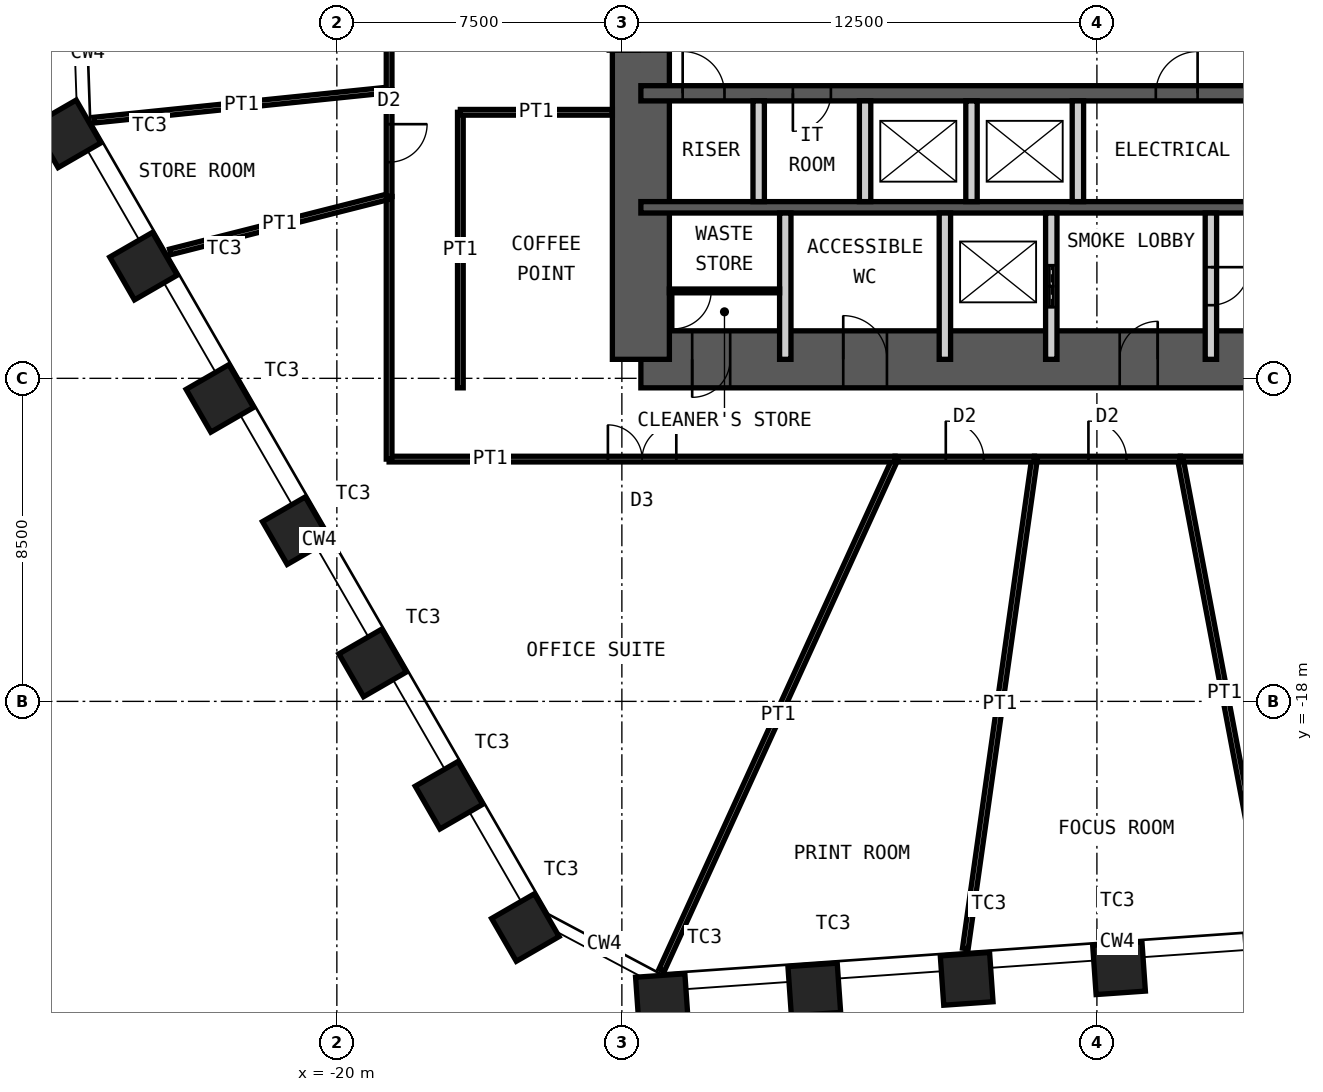
"""IFC4 building model, lengths in metres.
Left out: names, types, materials, properties, quantities, classifications, styles, units other than length and angle.
Written with IfcOpenShell. Run it as: python <this file> out.ifc"""

import sys

from ifc_helpers import new_model, si_unit, direction, frame, frame_2d, origin, origin_2d, place, context, subcontext, project, spatial, rectangle, hollow_rectangle, extrude, element, fill, save


model = new_model("IFC4")
c1 = context("Model", 3, precision=1e-05, world=origin(), true_north=direction((0.0, 1.0)))
c2 = subcontext(c1, "Body", "Model", "MODEL_VIEW")
j1 = project(units=[si_unit("LENGTHUNIT", "METRE"), si_unit("PLANEANGLEUNIT", "RADIAN")], contexts=[c1])
p1 = place(None, origin())
s1 = spatial("IfcSite", under=j1, at=p1, CompositionType="ELEMENT")
p2 = place(p1, origin())
s2 = spatial("IfcBuilding", under=s1, at=p2, CompositionType="ELEMENT")
p3 = place(p2, frame((0.0, 0.0, 115.6)))
s3 = spatial("IfcBuildingStorey", under=s2, at=p3, CompositionType="ELEMENT", Elevation=115.6)
for number, where, z_axis, x_axis in (
    (1, (0.582, -25.02, 0.0), (0.0, 0.0, 1.0), (0.998, 0.07, 0.0)),
    (2, (-3.427, -25.301, 0.0), (0.0, 0.0, 1.0), (0.998, 0.07, 0.0)),
    (3, (-7.436, -25.581, 0.0), (0.0, 0.0, 1.0), (0.998, 0.07, 0.0)),
    (4, (-11.446, -25.861, 0.0), (0.0, 0.0, 1.0), (0.998, 0.07, 0.0)),
    (5, (-15.04, -23.95, 0.0), (0.0, 0.0, 1.0), (0.5, -0.866, 0.0)),
    (6, (-17.049, -20.47, 0.0), (0.0, 0.0, 1.0), (0.5, -0.866, 0.0)),
    (7, (-19.059, -16.989, 0.0), (0.0, 0.0, 1.0), (0.5, -0.866, 0.0)),
    (8, (-21.068, -13.509, 0.0), (0.0, 0.0, 1.0), (0.5, -0.866, 0.0)),
    (9, (-23.078, -10.028, 0.0), (0.0, 0.0, 1.0), (0.5, -0.866, 0.0)),
    (10, (-25.087, -6.547, 0.0), (0.0, 0.0, 1.0), (0.5, -0.866, 0.0)),
    (11, (-27.097, -3.067, 0.0), (0.0, 0.0, 1.0), (0.5, -0.866, 0.0)),
):
    element("IfcColumn", number, at=place(p3, frame(where, z_axis=z_axis, x_axis=x_axis)), inside=s3, PredefinedType="COLUMN", context=c2, shape_type="SweptSolid", body=[
        extrude(hollow_rectangle(XDim=1.3, YDim=1.3, WallThickness=0.1, at=origin_2d()), origin(), (0.0, 0.0, 1.0), 4.2),
    ])
p4 = place(p3, frame((-12.0, -9.0, 0.0), z_axis=(0.0, 0.0, 1.0), x_axis=(1.0, 0.0, 0.0)))
e12 = element("IfcWall", 12, at=p4, inside=s3, PredefinedType="SHEAR", context=c2, shape_type="SweptSolid", body=[
    extrude(rectangle(XDim=24.0, YDim=1.5, at=frame_2d((12.0, 0.0))), origin(), (0.0, 0.0, 1.0), 4.2),
])
p5 = place(p4, frame((1.35, 0.0, 0.0)))
e13 = element("IfcOpeningElement", 13, at=p5, cuts=e12, PredefinedType="OPENING", context=c2, shape_type="SweptSolid", body=[
    extrude(rectangle(XDim=1.0, YDim=2.1, at=frame_2d((0.5, 1.05))), frame((0.0, 0.76, 0.0), z_axis=(0.0, -1.0, 0.0), x_axis=(1.0, 0.0, 0.0)), (0.0, 0.0, 1.0), 1.52),
])
p6 = place(p4, frame((5.325, 0.0, 0.0)))
e14 = element("IfcOpeningElement", 14, at=p6, cuts=e12, PredefinedType="OPENING", context=c2, shape_type="SweptSolid", body=[
    extrude(rectangle(XDim=1.15, YDim=2.1, at=frame_2d((0.575, 1.05))), frame((0.0, 0.76, 0.0), z_axis=(0.0, -1.0, 0.0), x_axis=(1.0, 0.0, 0.0)), (0.0, 0.0, 1.0), 1.52),
])
p7 = place(p4, frame((12.6, 0.0, 0.0)))
e15 = element("IfcOpeningElement", 15, at=p7, cuts=e12, PredefinedType="OPENING", context=c2, shape_type="SweptSolid", body=[
    extrude(rectangle(XDim=1.0, YDim=2.1, at=frame_2d((0.5, 1.05))), frame((0.0, 0.76, 0.0), z_axis=(0.0, -1.0, 0.0), x_axis=(1.0, 0.0, 0.0)), (0.0, 0.0, 1.0), 1.52),
])
p8 = place(p3, frame((-12.0, -9.0, 0.0), z_axis=(0.0, 0.0, 1.0), x_axis=(0.0, 1.0, 0.0)))
e16 = element("IfcWall", 16, at=p8, inside=s3, PredefinedType="SHEAR", context=c2, shape_type="SweptSolid", body=[
    extrude(rectangle(XDim=18.0, YDim=1.5, at=frame_2d((9.0, 0.0))), origin(), (0.0, 0.0, 1.0), 4.2),
])
p9 = place(p8, frame((8.1, 0.0, 0.0)))
e17 = element("IfcOpeningElement", 17, at=p9, cuts=e16, PredefinedType="OPENING", context=c2, shape_type="SweptSolid", body=[
    extrude(rectangle(XDim=1.8, YDim=2.1, at=frame_2d((0.9, 1.05))), frame((0.0, 0.76, 0.0), z_axis=(0.0, -1.0, 0.0), x_axis=(1.0, 0.0, 0.0)), (0.0, 0.0, 1.0), 1.52),
])
p10 = place(p3, frame((-12.0, -2.0, 0.0), z_axis=(0.0, 0.0, 1.0), x_axis=(1.0, 0.0, 0.0)))
e18 = element("IfcWall", 18, at=p10, inside=s3, PredefinedType="SHEAR", context=c2, shape_type="SweptSolid", body=[
    extrude(rectangle(XDim=24.0, YDim=0.4, at=frame_2d((12.0, 0.0))), origin(), (0.0, 0.0, 1.0), 4.2),
])
p11 = place(p10, frame((1.1, 0.0, 0.0)))
e19 = element("IfcOpeningElement", 19, at=p11, cuts=e18, PredefinedType="OPENING", context=c2, shape_type="SweptSolid", body=[
    extrude(rectangle(XDim=1.1, YDim=2.1, at=frame_2d((0.55, 1.05))), frame((0.0, 0.21, 0.0), z_axis=(0.0, -1.0, 0.0), x_axis=(1.0, 0.0, 0.0)), (0.0, 0.0, 1.0), 0.42),
])
p12 = place(p10, frame((13.55, 0.0, 0.0)))
e20 = element("IfcOpeningElement", 20, at=p12, cuts=e18, PredefinedType="OPENING", context=c2, shape_type="SweptSolid", body=[
    extrude(rectangle(XDim=1.1, YDim=2.1, at=frame_2d((0.55, 1.05))), frame((0.0, 0.21, 0.0), z_axis=(0.0, -1.0, 0.0), x_axis=(1.0, 0.0, 0.0)), (0.0, 0.0, 1.0), 0.42),
])
p13 = place(p10, frame((20.7, 0.0, 0.0)))
e21 = element("IfcOpeningElement", 21, at=p13, cuts=e18, PredefinedType="OPENING", context=c2, shape_type="SweptSolid", body=[
    extrude(rectangle(XDim=1.1, YDim=2.1, at=frame_2d((0.55, 1.05))), frame((0.0, 0.21, 0.0), z_axis=(0.0, -1.0, 0.0), x_axis=(1.0, 0.0, 0.0)), (0.0, 0.0, 1.0), 0.42),
])
p14 = place(p10, frame((4.0, 0.0, 0.0)))
e22 = element("IfcOpeningElement", 22, at=p14, cuts=e18, PredefinedType="OPENING", context=c2, shape_type="SweptSolid", body=[
    extrude(rectangle(XDim=1.0, YDim=2.1, at=frame_2d((0.5, 1.05))), frame((0.0, 0.21, 0.0), z_axis=(0.0, -1.0, 0.0), x_axis=(1.0, 0.0, 0.0)), (0.0, 0.0, 1.0), 0.42),
])
p15 = place(p3, frame((-12.0, -5.0, 0.0), z_axis=(0.0, 0.0, 1.0), x_axis=(1.0, 0.0, 0.0)))
e23 = element("IfcWall", 23, at=p15, inside=s3, PredefinedType="SHEAR", context=c2, shape_type="SweptSolid", body=[
    extrude(rectangle(XDim=24.0, YDim=0.3, at=frame_2d((12.0, 0.0))), origin(), (0.0, 0.0, 1.0), 4.2),
])
for number, where, z_axis, x_axis in (
    (24, (-8.9, -4.85, 0.0), (0.0, 0.0, 1.0), (0.0, 1.0, 0.0)),
    (25, (-6.1, -4.85, 0.0), (0.0, 0.0, 1.0), (0.0, 1.0, 0.0)),
    (26, (-3.3, -4.85, 0.0), (0.0, 0.0, 1.0), (0.0, 1.0, 0.0)),
    (27, (-0.5, -4.85, 0.0), (0.0, 0.0, 1.0), (0.0, 1.0, 0.0)),
):
    element("IfcWall", number, at=place(p3, frame(where, z_axis=z_axis, x_axis=x_axis)), inside=s3, PredefinedType="PARTITIONING", context=c2, shape_type="SweptSolid", body=[
        extrude(rectangle(XDim=2.65, YDim=0.3, at=frame_2d((1.325, 0.0))), origin(), (0.0, 0.0, 1.0), 3.98),
    ])
for number, where, z_axis, x_axis in (
    (28, (-8.2, -9.0, 0.0), (0.0, 0.0, 1.0), (0.0, 1.0, 0.0)),
    (29, (-4.0, -9.0, 0.0), (0.0, 0.0, 1.0), (0.0, 1.0, 0.0)),
):
    element("IfcWall", number, at=place(p3, frame(where, z_axis=z_axis, x_axis=x_axis)), inside=s3, PredefinedType="PARTITIONING", context=c2, shape_type="SweptSolid", body=[
        extrude(rectangle(XDim=3.85, YDim=0.3, at=frame_2d((1.925, 0.0))), origin(), (0.0, 0.0, 1.0), 3.98),
    ])
p16 = place(p3, frame((-1.2, -9.0, 0.0), z_axis=(0.0, 0.0, 1.0), x_axis=(0.0, 1.0, 0.0)))
e30 = element("IfcWall", 30, at=p16, inside=s3, PredefinedType="PARTITIONING", context=c2, shape_type="SweptSolid", body=[
    extrude(rectangle(XDim=3.85, YDim=0.3, at=frame_2d((1.925, 0.0))), origin(), (0.0, 0.0, 1.0), 3.98),
])
p17 = place(p16, frame((1.375, 0.0, 0.0)))
e31 = element("IfcOpeningElement", 31, at=p17, cuts=e30, PredefinedType="OPENING", context=c2, shape_type="SweptSolid", body=[
    extrude(rectangle(XDim=1.1, YDim=2.4, at=frame_2d((0.55, 1.2))), frame((0.0, 0.16, 0.0), z_axis=(0.0, -1.0, 0.0), x_axis=(1.0, 0.0, 0.0)), (0.0, 0.0, 1.0), 0.32),
])
p18 = place(p3, frame((3.0, -9.0, 0.0), z_axis=(0.0, 0.0, 1.0), x_axis=(0.0, 1.0, 0.0)))
e32 = element("IfcWall", 32, at=p18, inside=s3, PredefinedType="PARTITIONING", context=c2, shape_type="SweptSolid", body=[
    extrude(rectangle(XDim=3.85, YDim=0.3, at=frame_2d((1.925, 0.0))), origin(), (0.0, 0.0, 1.0), 3.98),
])
p19 = place(p18, frame((1.425, 0.0, 0.0)))
e33 = element("IfcOpeningElement", 33, at=p19, cuts=e32, PredefinedType="OPENING", context=c2, shape_type="SweptSolid", body=[
    extrude(rectangle(XDim=1.0, YDim=2.1, at=frame_2d((0.5, 1.05))), frame((0.0, 0.16, 0.0), z_axis=(0.0, -1.0, 0.0), x_axis=(1.0, 0.0, 0.0)), (0.0, 0.0, 1.0), 0.32),
])
p20 = place(p3, frame((-11.25, -7.2, 0.0), z_axis=(0.0, 0.0, 1.0), x_axis=(1.0, 0.0, 0.0)))
e34 = element("IfcWall", 34, at=p20, inside=s3, PredefinedType="PARTITIONING", context=c2, shape_type="SweptSolid", body=[
    extrude(rectangle(XDim=2.9, YDim=0.1, at=frame_2d((1.45, 0.0))), origin(), (0.0, 0.0, 1.0), 3.98),
])
p21 = place(p20, frame((0.1, 0.0, 0.0)))
e35 = element("IfcOpeningElement", 35, at=p21, cuts=e34, PredefinedType="OPENING", context=c2, shape_type="SweptSolid", body=[
    extrude(rectangle(XDim=1.0, YDim=2.4, at=frame_2d((0.5, 1.2))), frame((0.0, 0.06, 0.0), z_axis=(0.0, -1.0, 0.0), x_axis=(1.0, 0.0, 0.0)), (0.0, 0.0, 1.0), 0.12),
])
p22 = place(p3, frame((8.401, -11.625, 0.0), z_axis=(0.0, 0.0, 1.0), x_axis=(-1.0, 0.0, 0.0)))
e36 = element("IfcWall", 36, at=p22, inside=s3, PredefinedType="PARTITIONING", context=c2, shape_type="SweptSolid", body=[
    extrude(rectangle(XDim=6.205, YDim=0.15, at=frame_2d((3.103, 0.0))), origin(), (0.0, 0.0, 1.0), 4.03),
])
p23 = place(p22, frame((2.602, 0.0, 0.0)))
e37 = element("IfcOpeningElement", 37, at=p23, cuts=e36, PredefinedType="OPENING", context=c2, shape_type="SweptSolid", body=[
    extrude(rectangle(XDim=1.0, YDim=2.4, at=frame_2d((0.5, 1.2))), frame((0.0, 0.085, 0.0), z_axis=(0.0, -1.0, 0.0), x_axis=(1.0, 0.0, 0.0)), (0.0, 0.0, 1.0), 0.17),
])
p24 = place(p3, frame((4.524, -23.943, 0.0), z_axis=(0.0, 0.0, 1.0), x_axis=(-0.185671124909, 0.98261194445, 0.0)))
e38 = element("IfcWall", 38, at=p24, inside=s3, PredefinedType="PARTITIONING", context=c2, shape_type="SweptSolid", body=[
    extrude(rectangle(XDim=12.536, YDim=0.15, at=frame_2d((6.268, 0.0))), origin(), (0.0, 0.0, 1.0), 3.33),
])
p25 = place(p3, frame((2.197, -11.625, 0.0), z_axis=(0.0, 0.0, 1.0), x_axis=(-1.0, 0.0, 0.0)))
e39 = element("IfcWall", 39, at=p25, inside=s3, PredefinedType="PARTITIONING", context=c2, shape_type="SweptSolid", body=[
    extrude(rectangle(XDim=3.839, YDim=0.15, at=frame_2d((1.919, 0.0))), origin(), (0.0, 0.0, 1.0), 4.03),
])
p26 = place(p25, frame((1.419, 0.0, 0.0)))
e40 = element("IfcOpeningElement", 40, at=p26, cuts=e39, PredefinedType="OPENING", context=c2, shape_type="SweptSolid", body=[
    extrude(rectangle(XDim=1.0, YDim=2.4, at=frame_2d((0.5, 1.2))), frame((0.0, 0.085, 0.0), z_axis=(0.0, -1.0, 0.0), x_axis=(1.0, 0.0, 0.0)), (0.0, 0.0, 1.0), 0.17),
])
p27 = place(p3, frame((-3.462, -24.503, 0.0), z_axis=(0.0, 0.0, 1.0), x_axis=(0.139899618934, 0.990165691499, 0.0)))
e41 = element("IfcWall", 41, at=p27, inside=s3, PredefinedType="PARTITIONING", context=c2, shape_type="SweptSolid", body=[
    extrude(rectangle(XDim=13.006, YDim=0.15, at=frame_2d((6.503, 0.0))), origin(), (0.0, 0.0, 1.0), 3.33),
])
p28 = place(p3, frame((-1.642, -11.625, 0.0), z_axis=(0.0, 0.0, 1.0), x_axis=(-1.0, 0.0, 0.0)))
e42 = element("IfcWall", 42, at=p28, inside=s3, PredefinedType="PARTITIONING", context=c2, shape_type="SweptSolid", body=[
    extrude(rectangle(XDim=3.668, YDim=0.15, at=frame_2d((1.834, 0.0))), origin(), (0.0, 0.0, 1.0), 4.03),
])
p29 = place(p28, frame((1.334, 0.0, 0.0)))
e43 = element("IfcOpeningElement", 43, at=p29, cuts=e42, PredefinedType="OPENING", context=c2, shape_type="SweptSolid", body=[
    extrude(rectangle(XDim=1.0, YDim=2.4, at=frame_2d((0.5, 1.2))), frame((0.0, 0.085, 0.0), z_axis=(0.0, -1.0, 0.0), x_axis=(1.0, 0.0, 0.0)), (0.0, 0.0, 1.0), 0.17),
])
p30 = place(p3, frame((-11.453, -25.072, 0.0), z_axis=(0.0, 0.0, 1.0), x_axis=(0.415494357555, 0.909595755729, 0.0)))
e44 = element("IfcWall", 44, at=p30, inside=s3, PredefinedType="PARTITIONING", context=c2, shape_type="SweptSolid", body=[
    extrude(rectangle(XDim=14.784, YDim=0.15, at=frame_2d((7.392, 0.0))), origin(), (0.0, 0.0, 1.0), 2.93),
])
p31 = place(p3, frame((-5.31, -11.625, 0.0), z_axis=(0.0, 0.0, 1.0), x_axis=(-1.0, 0.0, 0.0)))
e45 = element("IfcWall", 45, at=p31, inside=s3, PredefinedType="PARTITIONING", context=c2, shape_type="SweptSolid", body=[
    extrude(rectangle(XDim=13.315, YDim=0.15, at=frame_2d((6.657, 0.0))), origin(), (0.0, 0.0, 1.0), 4.03),
])
p32 = place(p31, frame((5.757, 0.0, 0.0)))
e46 = element("IfcOpeningElement", 46, at=p32, cuts=e45, PredefinedType="OPENING", context=c2, shape_type="SweptSolid", body=[
    extrude(rectangle(XDim=1.8, YDim=2.4, at=frame_2d((0.9, 1.2))), frame((0.0, 0.085, 0.0), z_axis=(0.0, -1.0, 0.0), x_axis=(1.0, 0.0, 0.0)), (0.0, 0.0, 1.0), 0.17),
])
p33 = place(p3, frame((-18.625, -11.625, 0.0), z_axis=(0.0, 0.0, 1.0), x_axis=(0.0, 1.0, 0.0)))
e47 = element("IfcWall", 47, at=p33, inside=s3, PredefinedType="PARTITIONING", context=c2, shape_type="SweptSolid", body=[
    extrude(rectangle(XDim=6.91, YDim=0.15, at=frame_2d((3.455, 0.0))), origin(), (0.0, 0.0, 1.0), 4.03),
])
p34 = place(p3, frame((-24.384, -6.173, 0.0), z_axis=(0.0, 0.0, 1.0), x_axis=(0.969427635767, 0.245377380804, 0.0)))
e48 = element("IfcWall", 48, at=p34, inside=s3, PredefinedType="PARTITIONING", context=c2, shape_type="SweptSolid", body=[
    extrude(rectangle(XDim=5.941, YDim=0.15, at=frame_2d((2.97, 0.0))), origin(), (0.0, 0.0, 1.0), 3.33),
])
p35 = place(p3, frame((-18.625, -4.715, 0.0), z_axis=(0.0, 0.0, 1.0), x_axis=(0.0, 1.0, 0.0)))
e49 = element("IfcWall", 49, at=p35, inside=s3, PredefinedType="PARTITIONING", context=c2, shape_type="SweptSolid", body=[
    extrude(rectangle(XDim=2.805, YDim=0.15, at=frame_2d((1.402, 0.0))), origin(), (0.0, 0.0, 1.0), 4.03),
])
p36 = place(p35, frame((0.902, 0.0, 0.0)))
e50 = element("IfcOpeningElement", 50, at=p36, cuts=e49, PredefinedType="OPENING", context=c2, shape_type="SweptSolid", body=[
    extrude(rectangle(XDim=1.0, YDim=2.4, at=frame_2d((0.5, 1.2))), frame((0.0, 0.085, 0.0), z_axis=(0.0, -1.0, 0.0), x_axis=(1.0, 0.0, 0.0)), (0.0, 0.0, 1.0), 0.17),
])
p37 = place(p3, frame((-26.391, -2.706, 0.0), z_axis=(0.0, 0.0, 1.0), x_axis=(0.994783554373, 0.10200823471, 0.0)))
e51 = element("IfcWall", 51, at=p37, inside=s3, PredefinedType="PARTITIONING", context=c2, shape_type="SweptSolid", body=[
    extrude(rectangle(XDim=7.807, YDim=0.15, at=frame_2d((3.904, 0.0))), origin(), (0.0, 0.0, 1.0), 2.93),
])
p38 = place(p3, frame((-18.625, -1.91, 0.0), z_axis=(0.0, 0.0, 1.0), x_axis=(0.0, 1.0, 0.0)))
e52 = element("IfcWall", 52, at=p38, inside=s3, PredefinedType="PARTITIONING", context=c2, shape_type="SweptSolid", body=[
    extrude(rectangle(XDim=13.535, YDim=0.15, at=frame_2d((6.768, 0.0))), origin(), (0.0, 0.0, 1.0), 4.03),
])
p39 = place(p38, frame((5.867, 0.0, 0.0)))
e53 = element("IfcOpeningElement", 53, at=p39, cuts=e52, PredefinedType="OPENING", context=c2, shape_type="SweptSolid", body=[
    extrude(rectangle(XDim=1.8, YDim=2.4, at=frame_2d((0.9, 1.2))), frame((0.0, 0.085, 0.0), z_axis=(0.0, -1.0, 0.0), x_axis=(1.0, 0.0, 0.0)), (0.0, 0.0, 1.0), 0.17),
])
p40 = place(p3, frame((-16.75, -9.75, 0.0), z_axis=(0.0, 0.0, 1.0), x_axis=(0.0, 1.0, 0.0)))
e54 = element("IfcWall", 54, at=p40, inside=s3, PredefinedType="PARTITIONING", context=c2, shape_type="SweptSolid", body=[
    extrude(rectangle(XDim=7.25, YDim=0.15, at=frame_2d((3.625, 0.0))), origin(), (0.0, 0.0, 1.0), 4.03),
])
p41 = place(p3, frame((-12.75, -2.5, 0.0), z_axis=(0.0, 0.0, 1.0), x_axis=(-1.0, 0.0, 0.0)))
e55 = element("IfcWall", 55, at=p41, inside=s3, PredefinedType="PARTITIONING", context=c2, shape_type="SweptSolid", body=[
    extrude(rectangle(XDim=4.0, YDim=0.15, at=frame_2d((2.0, 0.0))), origin(), (0.0, 0.0, 1.0), 3.33),
])
p42 = place(p5, origin())
e56 = element("IfcDoor", 56, at=p42, inside=s3, OperationType="SINGLE_SWING_LEFT", PredefinedType="DOOR", context=c2, shape_type="SweptSolid", body=[
    extrude(rectangle(XDim=1.0, YDim=2.1, at=frame_2d((0.5, 1.05))), frame((0.0, 0.025, 0.0), z_axis=(0.0, -1.0, 0.0), x_axis=(1.0, 0.0, 0.0)), (0.0, 0.0, 1.0), 0.05),
])
fill(e13, e56)
p43 = place(p6, origin())
e57 = element("IfcDoor", 57, at=p43, inside=s3, OperationType="SINGLE_SWING_RIGHT", PredefinedType="DOOR", context=c2, shape_type="SweptSolid", body=[
    extrude(rectangle(XDim=1.15, YDim=2.1, at=frame_2d((0.575, 1.05))), frame((0.0, 0.025, 0.0), z_axis=(0.0, -1.0, 0.0), x_axis=(1.0, 0.0, 0.0)), (0.0, 0.0, 1.0), 0.05),
])
fill(e14, e57)
p44 = place(p7, origin())
e58 = element("IfcDoor", 58, at=p44, inside=s3, OperationType="SINGLE_SWING_LEFT", PredefinedType="DOOR", context=c2, shape_type="SweptSolid", body=[
    extrude(rectangle(XDim=1.0, YDim=2.1, at=frame_2d((0.5, 1.05))), frame((0.0, 0.025, 0.0), z_axis=(0.0, -1.0, 0.0), x_axis=(1.0, 0.0, 0.0)), (0.0, 0.0, 1.0), 0.05),
])
fill(e15, e58)
p45 = place(p19, origin())
e59 = element("IfcDoor", 59, at=p45, inside=s3, OperationType="SINGLE_SWING_RIGHT", PredefinedType="DOOR", context=c2, shape_type="SweptSolid", body=[
    extrude(rectangle(XDim=1.0, YDim=2.1, at=frame_2d((0.5, 1.05))), frame((0.0, 0.025, 0.0), z_axis=(0.0, -1.0, 0.0), x_axis=(1.0, 0.0, 0.0)), (0.0, 0.0, 1.0), 0.05),
])
fill(e33, e59)
p46 = place(p11, origin())
e60 = element("IfcDoor", 60, at=p46, inside=s3, OperationType="SINGLE_SWING_RIGHT", PredefinedType="DOOR", context=c2, shape_type="SweptSolid", body=[
    extrude(rectangle(XDim=1.1, YDim=2.1, at=frame_2d((0.55, 1.05))), frame((0.0, 0.025, 0.0), z_axis=(0.0, -1.0, 0.0), x_axis=(1.0, 0.0, 0.0)), (0.0, 0.0, 1.0), 0.05),
])
fill(e19, e60)
p47 = place(p12, origin())
e61 = element("IfcDoor", 61, at=p47, inside=s3, OperationType="SINGLE_SWING_LEFT", PredefinedType="DOOR", context=c2, shape_type="SweptSolid", body=[
    extrude(rectangle(XDim=1.1, YDim=2.1, at=frame_2d((0.55, 1.05))), frame((0.0, 0.025, 0.0), z_axis=(0.0, -1.0, 0.0), x_axis=(1.0, 0.0, 0.0)), (0.0, 0.0, 1.0), 0.05),
])
fill(e20, e61)
p48 = place(p17, origin())
e62 = element("IfcDoor", 62, at=p48, inside=s3, OperationType="DOUBLE_DOOR_SLIDING", PredefinedType="DOOR", context=c2, shape_type="SweptSolid", body=[
    extrude(rectangle(XDim=1.1, YDim=2.4, at=frame_2d((0.55, 1.2))), frame((0.0, 0.025, 0.0), z_axis=(0.0, -1.0, 0.0), x_axis=(1.0, 0.0, 0.0)), (0.0, 0.0, 1.0), 0.05),
])
fill(e31, e62)
p49 = place(p14, origin())
e63 = element("IfcDoor", 63, at=p49, inside=s3, OperationType="SINGLE_SWING_LEFT", PredefinedType="DOOR", context=c2, shape_type="SweptSolid", body=[
    extrude(rectangle(XDim=1.0, YDim=2.1, at=frame_2d((0.5, 1.05))), frame((0.0, 0.025, 0.0), z_axis=(0.0, -1.0, 0.0), x_axis=(1.0, 0.0, 0.0)), (0.0, 0.0, 1.0), 0.05),
])
fill(e22, e63)
p50 = place(p21, origin())
e64 = element("IfcDoor", 64, at=p50, inside=s3, OperationType="SINGLE_SWING_LEFT", PredefinedType="DOOR", context=c2, shape_type="SweptSolid", body=[
    extrude(rectangle(XDim=1.0, YDim=2.4, at=frame_2d((0.5, 1.2))), frame((0.0, 0.025, 0.0), z_axis=(0.0, -1.0, 0.0), x_axis=(1.0, 0.0, 0.0)), (0.0, 0.0, 1.0), 0.05),
])
fill(e35, e64)
p51 = place(p26, origin())
e65 = element("IfcDoor", 65, at=p51, inside=s3, OperationType="SINGLE_SWING_RIGHT", PredefinedType="DOOR", context=c2, shape_type="SweptSolid", body=[
    extrude(rectangle(XDim=1.0, YDim=2.4, at=frame_2d((0.5, 1.2))), frame((0.0, 0.025, 0.0), z_axis=(0.0, -1.0, 0.0), x_axis=(1.0, 0.0, 0.0)), (0.0, 0.0, 1.0), 0.05),
])
fill(e40, e65)
p52 = place(p29, origin())
e66 = element("IfcDoor", 66, at=p52, inside=s3, OperationType="SINGLE_SWING_RIGHT", PredefinedType="DOOR", context=c2, shape_type="SweptSolid", body=[
    extrude(rectangle(XDim=1.0, YDim=2.4, at=frame_2d((0.5, 1.2))), frame((0.0, 0.025, 0.0), z_axis=(0.0, -1.0, 0.0), x_axis=(1.0, 0.0, 0.0)), (0.0, 0.0, 1.0), 0.05),
])
fill(e43, e66)
p53 = place(p32, origin())
e67 = element("IfcDoor", 67, at=p53, inside=s3, OperationType="DOUBLE_DOOR_DOUBLE_SWING", PredefinedType="DOOR", context=c2, shape_type="SweptSolid", body=[
    extrude(rectangle(XDim=1.8, YDim=2.4, at=frame_2d((0.9, 1.2))), frame((0.0, 0.025, 0.0), z_axis=(0.0, -1.0, 0.0), x_axis=(1.0, 0.0, 0.0)), (0.0, 0.0, 1.0), 0.05),
])
fill(e46, e67)
p54 = place(p36, origin())
e68 = element("IfcDoor", 68, at=p54, inside=s3, OperationType="SINGLE_SWING_RIGHT", PredefinedType="DOOR", context=c2, shape_type="SweptSolid", body=[
    extrude(rectangle(XDim=1.0, YDim=2.4, at=frame_2d((0.5, 1.2))), frame((0.0, 0.025, 0.0), z_axis=(0.0, -1.0, 0.0), x_axis=(1.0, 0.0, 0.0)), (0.0, 0.0, 1.0), 0.05),
])
fill(e50, e68)
save(model, sys.argv[1])
